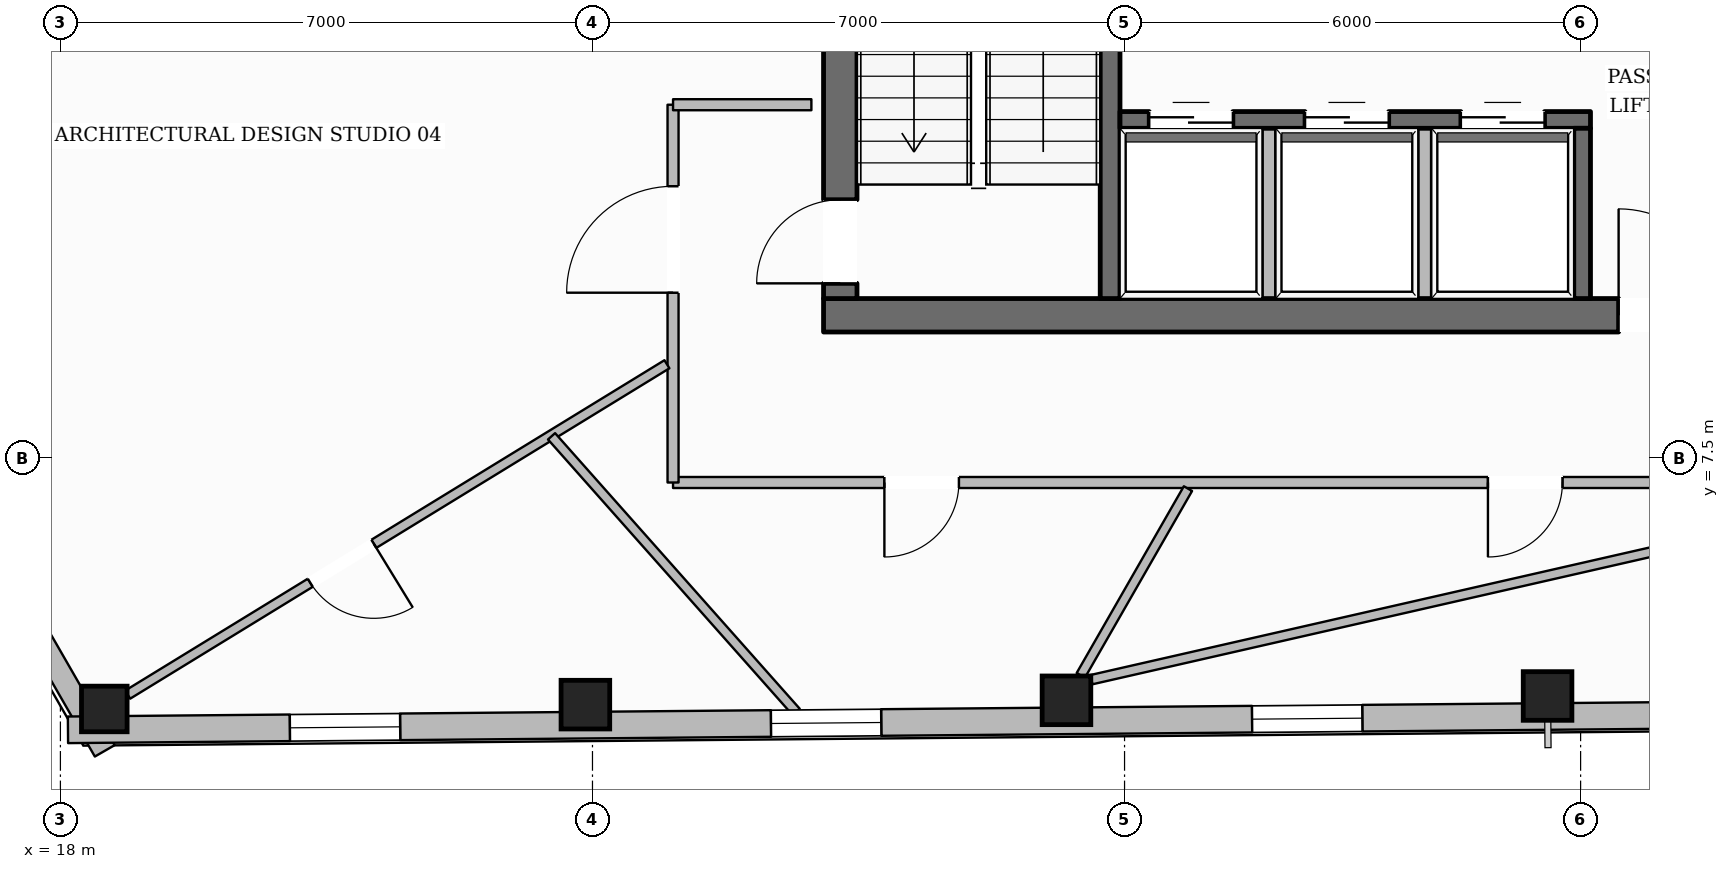
"""IFC4 building model, lengths in metres.
Left out: names, types, materials, properties, quantities, classifications, styles, units other than length and angle.
Written with IfcOpenShell. Run it as: python <this file> out.ifc"""

import sys

from ifc_helpers import new_model, si_unit, direction, frame, frame_2d, origin, origin_2d, place, context, subcontext, project, spatial, rectangle, hollow_rectangle, extrude, element, fill, save


model = new_model("IFC4")
c1 = context("Model", 3, precision=1e-05, world=origin(), true_north=direction((0.0, 1.0)))
c2 = subcontext(c1, "Body", "Model", "MODEL_VIEW")
j1 = project(units=[si_unit("LENGTHUNIT", "METRE"), si_unit("PLANEANGLEUNIT", "RADIAN")], contexts=[c1])
p1 = place(None, origin())
s1 = spatial("IfcSite", under=j1, at=p1, CompositionType="ELEMENT")
p2 = place(p1, origin())
s2 = spatial("IfcBuilding", under=s1, at=p2, CompositionType="ELEMENT")
p3 = place(p2, frame((0.0, 0.0, 215.05)))
s3 = spatial("IfcBuildingStorey", under=s2, at=p3, CompositionType="ELEMENT", Elevation=215.05)
p4 = place(p3, frame((28.04, 9.38, 0.0), z_axis=(0.0, 0.0, 1.0), x_axis=(1.0, 0.0, 0.0)))
e1 = element("IfcWall", 1, at=p4, inside=s3, PredefinedType="SOLIDWALL", context=c2, shape_type="SweptSolid", body=[
    extrude(rectangle(XDim=19.92, YDim=0.44, at=frame_2d((9.96, 0.0))), origin(), (0.0, 0.0, 1.0), 3.6),
])
p5 = place(p4, frame((10.46, 0.0, 0.0)))
e2 = element("IfcOpeningElement", 2, at=p5, cuts=e1, PredefinedType="OPENING", context=c2, shape_type="SweptSolid", body=[
    extrude(rectangle(XDim=1.4, YDim=2.2, at=frame_2d((0.7, 1.1))), frame((0.0, 0.23, 0.0), z_axis=(0.0, -1.0, 0.0), x_axis=(1.0, 0.0, 0.0)), (0.0, 0.0, 1.0), 0.46),
])
p6 = place(p3, frame((28.26, 9.6, 0.0), z_axis=(0.0, 0.0, 1.0), x_axis=(0.0, 1.0, 0.0)))
e3 = element("IfcWall", 3, at=p6, inside=s3, PredefinedType="SOLIDWALL", context=c2, shape_type="SweptSolid", body=[
    extrude(rectangle(XDim=13.0, YDim=0.44, at=frame_2d((6.5, 0.0))), origin(), (0.0, 0.0, 1.0), 3.6),
])
p7 = place(p6, frame((0.2, 0.0, 0.0)))
e4 = element("IfcOpeningElement", 4, at=p7, cuts=e3, PredefinedType="OPENING", context=c2, shape_type="SweptSolid", body=[
    extrude(rectangle(XDim=1.1, YDim=2.15, at=frame_2d((0.55, 1.075))), frame((0.0, 0.23, 0.0), z_axis=(0.0, -1.0, 0.0), x_axis=(1.0, 0.0, 0.0)), (0.0, 0.0, 1.0), 0.46),
])
p8 = place(p6, frame((8.4, 0.0, 0.0)))
e5 = element("IfcOpeningElement", 5, at=p8, cuts=e3, PredefinedType="OPENING", context=c2, shape_type="SweptSolid", body=[
    extrude(rectangle(XDim=0.9, YDim=2.1, at=frame_2d((0.45, 1.05))), frame((0.0, 0.23, 0.0), z_axis=(0.0, -1.0, 0.0), x_axis=(1.0, 0.0, 0.0)), (0.0, 0.0, 1.0), 0.46),
])
p9 = place(p3, frame((31.81, 9.6, 0.0), z_axis=(0.0, 0.0, 1.0), x_axis=(0.0, 1.0, 0.0)))
e6 = element("IfcWall", 6, at=p9, inside=s3, PredefinedType="SHEAR", context=c2, shape_type="SweptSolid", body=[
    extrude(rectangle(XDim=13.0, YDim=0.26, at=frame_2d((6.5, 0.0))), origin(), (0.0, 0.0, 1.0), 3.6),
])
p10 = place(p9, frame((10.925, 0.0, 0.0)))
e7 = element("IfcOpeningElement", 7, at=p10, cuts=e6, PredefinedType="OPENING", context=c2, shape_type="SweptSolid", body=[
    extrude(rectangle(XDim=1.25, YDim=2.25, at=frame_2d((0.625, 1.125))), frame((0.0, 0.14, 0.0), z_axis=(0.0, -1.0, 0.0), x_axis=(1.0, 0.0, 0.0)), (0.0, 0.0, 1.0), 0.28),
])
p11 = place(p3, frame((31.94, 11.95, 0.0), z_axis=(0.0, 0.0, 1.0), x_axis=(1.0, 0.0, 0.0)))
e8 = element("IfcWall", 8, at=p11, inside=s3, PredefinedType="SOLIDWALL", context=c2, shape_type="SweptSolid", body=[
    extrude(rectangle(XDim=6.19, YDim=0.22, at=frame_2d((3.095, 0.0))), origin(), (0.0, 0.0, 1.0), 3.6),
])
p12 = place(p11, frame((0.385, 0.0, 0.0)))
e9 = element("IfcOpeningElement", 9, at=p12, cuts=e8, PredefinedType="OPENING", context=c2, shape_type="SweptSolid", body=[
    extrude(rectangle(XDim=1.1, YDim=2.2, at=frame_2d((0.55, 1.1))), frame((0.0, 0.12, 0.0), z_axis=(0.0, -1.0, 0.0), x_axis=(1.0, 0.0, 0.0)), (0.0, 0.0, 1.0), 0.24),
])
p13 = place(p11, frame((2.435, 0.0, 0.0)))
e10 = element("IfcOpeningElement", 10, at=p13, cuts=e8, PredefinedType="OPENING", context=c2, shape_type="SweptSolid", body=[
    extrude(rectangle(XDim=1.1, YDim=2.2, at=frame_2d((0.55, 1.1))), frame((0.0, 0.12, 0.0), z_axis=(0.0, -1.0, 0.0), x_axis=(1.0, 0.0, 0.0)), (0.0, 0.0, 1.0), 0.24),
])
p14 = place(p11, frame((4.485, 0.0, 0.0)))
e11 = element("IfcOpeningElement", 11, at=p14, cuts=e8, PredefinedType="OPENING", context=c2, shape_type="SweptSolid", body=[
    extrude(rectangle(XDim=1.1, YDim=2.2, at=frame_2d((0.55, 1.1))), frame((0.0, 0.12, 0.0), z_axis=(0.0, -1.0, 0.0), x_axis=(1.0, 0.0, 0.0)), (0.0, 0.0, 1.0), 0.24),
])
p15 = place(p3, frame((38.02, 9.6, 0.0), z_axis=(0.0, 0.0, 1.0), x_axis=(0.0, 1.0, 0.0)))
e12 = element("IfcWall", 12, at=p15, inside=s3, PredefinedType="SOLIDWALL", context=c2, shape_type="SweptSolid", body=[
    extrude(rectangle(XDim=2.24, YDim=0.22, at=frame_2d((1.12, 0.0))), origin(), (0.0, 0.0, 1.0), 3.6),
])
p16 = place(p3, frame((18.577, 4.201, 0.0), z_axis=(0.0, 0.0, 1.0), x_axis=(1.0, 0.0, 0.0)))
e13 = element("IfcColumn", 13, at=p16, inside=s3, PredefinedType="COLUMN", context=c2, shape_type="SweptSolid", body=[
    extrude(hollow_rectangle(XDim=0.6, YDim=0.6, WallThickness=0.028, at=origin_2d()), origin(), (0.0, 0.0, 1.0), 3.6),
])
for number, where, z_axis, x_axis in (
    (14, (24.907, 4.258, 0.0), (0.0, 0.0, 1.0), (1.0, 0.0, 0.0)),
    (15, (31.236, 4.314, 0.0), (0.0, 0.0, 1.0), (1.0, 0.0, 0.0)),
    (16, (37.565, 4.372, 0.0), (0.0, 0.0, 1.0), (1.0, 0.0, 0.0)),
):
    element("IfcColumn", number, at=place(p3, frame(where, z_axis=z_axis, x_axis=x_axis)), inside=s3, PredefinedType="COLUMN", context=c2, shape_type="SweptSolid", body=[
        extrude(hollow_rectangle(XDim=0.64, YDim=0.64, WallThickness=0.028, at=origin_2d()), origin(), (0.0, 0.0, 1.0), 3.6),
    ])
p17 = place(p3, frame((14.13, 10.825, 0.0), z_axis=(0.0, 0.0, 1.0), x_axis=(0.506658543763, 0.862146808863, 0.0)))
e17 = element("IfcWall", 17, at=p17, inside=s3, PredefinedType="STANDARD", context=c2, shape_type="SweptSolid", body=[
    extrude(rectangle(XDim=39.014, YDim=0.35, at=frame_2d((19.507, 0.0))), origin(), (0.0, 0.0, 1.0), 3.132),
])
p18 = place(p17, frame((9.354, 0.0, 0.0)))
e18 = element("IfcOpeningElement", 18, at=p18, cuts=e17, PredefinedType="OPENING", context=c2, shape_type="SweptSolid", body=[
    extrude(rectangle(XDim=1.0, YDim=2.2, at=frame_2d((0.5, 1.1))), frame((0.0, 0.185, 0.0), z_axis=(0.0, -1.0, 0.0), x_axis=(1.0, 0.0, 0.0)), (0.0, 0.0, 1.0), 0.37),
])
p19 = place(p17, frame((34.645, 0.0, 0.65)))
e19 = element("IfcOpeningElement", 19, at=p19, cuts=e17, PredefinedType="OPENING", context=c2, shape_type="SweptSolid", body=[
    extrude(rectangle(XDim=1.45, YDim=1.75, at=frame_2d((0.725, 0.875))), frame((0.0, 0.185, 0.0), z_axis=(0.0, -1.0, 0.0), x_axis=(1.0, 0.0, 0.0)), (0.0, 0.0, 1.0), 0.37),
])
p20 = place(p17, frame((28.301, 0.0, 0.65)))
e20 = element("IfcOpeningElement", 20, at=p20, cuts=e17, PredefinedType="OPENING", context=c2, shape_type="SweptSolid", body=[
    extrude(rectangle(XDim=1.45, YDim=1.75, at=frame_2d((0.725, 0.875))), frame((0.0, 0.185, 0.0), z_axis=(0.0, -1.0, 0.0), x_axis=(1.0, 0.0, 0.0)), (0.0, 0.0, 1.0), 0.37),
])
p21 = place(p17, frame((21.958, 0.0, 0.65)))
e21 = element("IfcOpeningElement", 21, at=p21, cuts=e17, PredefinedType="OPENING", context=c2, shape_type="SweptSolid", body=[
    extrude(rectangle(XDim=1.45, YDim=1.75, at=frame_2d((0.725, 0.875))), frame((0.0, 0.185, 0.0), z_axis=(0.0, -1.0, 0.0), x_axis=(1.0, 0.0, 0.0)), (0.0, 0.0, 1.0), 0.37),
])
p22 = place(p17, frame((2.926, 0.0, 0.65)))
e22 = element("IfcOpeningElement", 22, at=p22, cuts=e17, PredefinedType="OPENING", context=c2, shape_type="SweptSolid", body=[
    extrude(rectangle(XDim=1.45, YDim=1.75, at=frame_2d((0.725, 0.875))), frame((0.0, 0.185, 0.0), z_axis=(0.0, -1.0, 0.0), x_axis=(1.0, 0.0, 0.0)), (0.0, 0.0, 1.0), 0.37),
])
p23 = place(p3, frame((18.583, 3.65, 0.0), z_axis=(0.0, 0.0, 1.0), x_axis=(-0.498897804032, 0.866660822428, 0.0)))
e23 = element("IfcWall", 23, at=p23, inside=s3, PredefinedType="STANDARD", context=c2, shape_type="SweptSolid", body=[
    extrude(rectangle(XDim=8.922, YDim=0.3, at=frame_2d((4.461, 0.0))), origin(), (0.0, 0.0, 1.0), 3.132),
])
p24 = place(p23, frame((3.936, 0.0, 0.65)))
e24 = element("IfcOpeningElement", 24, at=p24, cuts=e23, PredefinedType="OPENING", context=c2, shape_type="SweptSolid", body=[
    extrude(rectangle(XDim=1.05, YDim=1.7, at=frame_2d((0.525, 0.85))), frame((0.0, 0.16, 0.0), z_axis=(0.0, -1.0, 0.0), x_axis=(1.0, 0.0, 0.0)), (0.0, 0.0, 1.0), 0.32),
])
p25 = place(p3, frame((57.027, 4.277, 0.0), z_axis=(0.0, 0.0, 1.0), x_axis=(-0.999959560683, -0.008993163978, 0.0)))
e25 = element("IfcWall", 25, at=p25, inside=s3, PredefinedType="STANDARD", context=c2, shape_type="SweptSolid", body=[
    extrude(rectangle(XDim=38.929, YDim=0.35, at=frame_2d((19.465, 0.0))), origin(), (0.0, 0.0, 1.0), 3.132),
])
p26 = place(p25, frame((9.332, 0.0, 0.0)))
e26 = element("IfcOpeningElement", 26, at=p26, cuts=e25, PredefinedType="OPENING", context=c2, shape_type="SweptSolid", body=[
    extrude(rectangle(XDim=1.0, YDim=2.2, at=frame_2d((0.5, 1.1))), frame((0.0, 0.185, 0.0), z_axis=(0.0, -1.0, 0.0), x_axis=(1.0, 0.0, 0.0)), (0.0, 0.0, 1.0), 0.37),
])
p27 = place(p25, frame((34.559, 0.0, 0.65)))
e27 = element("IfcOpeningElement", 27, at=p27, cuts=e25, PredefinedType="OPENING", context=c2, shape_type="SweptSolid", body=[
    extrude(rectangle(XDim=1.45, YDim=1.75, at=frame_2d((0.725, 0.875))), frame((0.0, 0.185, 0.0), z_axis=(0.0, -1.0, 0.0), x_axis=(1.0, 0.0, 0.0)), (0.0, 0.0, 1.0), 0.37),
])
p28 = place(p25, frame((28.229, 0.0, 0.65)))
e28 = element("IfcOpeningElement", 28, at=p28, cuts=e25, PredefinedType="OPENING", context=c2, shape_type="SweptSolid", body=[
    extrude(rectangle(XDim=1.45, YDim=1.75, at=frame_2d((0.725, 0.875))), frame((0.0, 0.185, 0.0), z_axis=(0.0, -1.0, 0.0), x_axis=(1.0, 0.0, 0.0)), (0.0, 0.0, 1.0), 0.37),
])
p29 = place(p25, frame((21.9, 0.0, 0.65)))
e29 = element("IfcOpeningElement", 29, at=p29, cuts=e25, PredefinedType="OPENING", context=c2, shape_type="SweptSolid", body=[
    extrude(rectangle(XDim=1.45, YDim=1.75, at=frame_2d((0.725, 0.875))), frame((0.0, 0.185, 0.0), z_axis=(0.0, -1.0, 0.0), x_axis=(1.0, 0.0, 0.0)), (0.0, 0.0, 1.0), 0.37),
])
p30 = place(p25, frame((2.912, 0.0, 0.65)))
e30 = element("IfcOpeningElement", 30, at=p30, cuts=e25, PredefinedType="OPENING", context=c2, shape_type="SweptSolid", body=[
    extrude(rectangle(XDim=1.45, YDim=1.75, at=frame_2d((0.725, 0.875))), frame((0.0, 0.185, 0.0), z_axis=(0.0, -1.0, 0.0), x_axis=(1.0, 0.0, 0.0)), (0.0, 0.0, 1.0), 0.37),
])
for number, where, z_axis, x_axis in (
    (31, (33.9, 9.52, 0.0), (0.0, 0.0, 1.0), (0.0, 1.0, 0.0)),
    (32, (35.95, 9.52, 0.0), (0.0, 0.0, 1.0), (0.0, 1.0, 0.0)),
):
    element("IfcWall", number, at=place(p3, frame(where, z_axis=z_axis, x_axis=x_axis)), inside=s3, PredefinedType="PARTITIONING", context=c2, shape_type="SweptSolid", body=[
        extrude(rectangle(XDim=2.32, YDim=0.165, at=frame_2d((1.16, 0.0))), origin(), (0.0, 0.0, 1.0), 3.6),
    ])
p31 = place(p3, frame((49.94, 7.18, 0.0), z_axis=(0.0, 0.0, 1.0), x_axis=(-1.0, 0.0, 0.0)))
e33 = element("IfcWall", 33, at=p31, inside=s3, PredefinedType="PARTITIONING", context=c2, shape_type="SweptSolid", body=[
    extrude(rectangle(XDim=23.88, YDim=0.145, at=frame_2d((11.94, 0.0))), origin(), (0.0, 0.0, 1.0), 3.6),
])
p32 = place(p31, frame((20.119, 0.0, 0.0)))
e34 = element("IfcOpeningElement", 34, at=p32, cuts=e33, PredefinedType="OPENING", context=c2, shape_type="SweptSolid", body=[
    extrude(rectangle(XDim=0.98, YDim=2.15, at=frame_2d((0.49, 1.075))), frame((0.0, 0.083, 0.0), z_axis=(0.0, -1.0, 0.0), x_axis=(1.0, 0.0, 0.0)), (0.0, 0.0, 1.0), 0.165),
])
p33 = place(p31, frame((12.179, 0.0, 0.0)))
e35 = element("IfcOpeningElement", 35, at=p33, cuts=e33, PredefinedType="OPENING", context=c2, shape_type="SweptSolid", body=[
    extrude(rectangle(XDim=0.98, YDim=2.15, at=frame_2d((0.49, 1.075))), frame((0.0, 0.083, 0.0), z_axis=(0.0, -1.0, 0.0), x_axis=(1.0, 0.0, 0.0)), (0.0, 0.0, 1.0), 0.165),
])
p34 = place(p31, frame((4.392, 0.0, 0.0)))
e36 = element("IfcOpeningElement", 36, at=p34, cuts=e33, PredefinedType="OPENING", context=c2, shape_type="SweptSolid", body=[
    extrude(rectangle(XDim=0.98, YDim=2.15, at=frame_2d((0.49, 1.075))), frame((0.0, 0.083, 0.0), z_axis=(0.0, -1.0, 0.0), x_axis=(1.0, 0.0, 0.0)), (0.0, 0.0, 1.0), 0.165),
])
p35 = place(p3, frame((26.06, 7.18, 0.0), z_axis=(0.0, 0.0, 1.0), x_axis=(0.0, 1.0, 0.0)))
e37 = element("IfcWall", 37, at=p35, inside=s3, PredefinedType="PARTITIONING", context=c2, shape_type="SweptSolid", body=[
    extrude(rectangle(XDim=4.97, YDim=0.145, at=frame_2d((2.485, 0.0))), origin(), (0.0, 0.0, 1.0), 3.6),
])
p36 = place(p35, frame((2.497, 0.0, 0.0)))
e38 = element("IfcOpeningElement", 38, at=p36, cuts=e37, PredefinedType="OPENING", context=c2, shape_type="SweptSolid", body=[
    extrude(rectangle(XDim=1.4, YDim=2.2, at=frame_2d((0.7, 1.1))), frame((0.0, 0.083, 0.0), z_axis=(0.0, -1.0, 0.0), x_axis=(1.0, 0.0, 0.0)), (0.0, 0.0, 1.0), 0.165),
])
p37 = place(p3, frame((26.06, 12.15, 0.0), z_axis=(0.0, 0.0, 1.0), x_axis=(1.0, 0.0, 0.0)))
e39 = element("IfcWall", 39, at=p37, inside=s3, PredefinedType="PARTITIONING", context=c2, shape_type="SweptSolid", body=[
    extrude(rectangle(XDim=1.82, YDim=0.145, at=frame_2d((0.91, 0.0))), origin(), (0.0, 0.0, 1.0), 3.6),
])
p38 = place(p3, frame((25.979, 8.736, 0.0), z_axis=(0.0, 0.0, 1.0), x_axis=(-0.852694447683, -0.522409972043, 0.0)))
e40 = element("IfcWall", 40, at=p38, inside=s3, PredefinedType="PARTITIONING", context=c2, shape_type="SweptSolid", body=[
    extrude(rectangle(XDim=8.32, YDim=0.125, at=frame_2d((4.16, 0.0))), origin(), (0.0, 0.0, 1.0), 3.141),
])
p39 = place(p38, frame((4.522, 0.0, 0.0)))
e41 = element("IfcOpeningElement", 41, at=p39, cuts=e40, PredefinedType="OPENING", context=c2, shape_type="SweptSolid", body=[
    extrude(rectangle(XDim=0.98, YDim=2.15, at=frame_2d((0.49, 1.075))), frame((0.0, 0.073, 0.0), z_axis=(0.0, -1.0, 0.0), x_axis=(1.0, 0.0, 0.0)), (0.0, 0.0, 1.0), 0.145),
])
p40 = place(p3, frame((32.834, 7.1, 0.0), z_axis=(0.0, 0.0, 1.0), x_axis=(-0.497706658822, -0.867345422404, 0.0)))
e42 = element("IfcWall", 42, at=p40, inside=s3, PredefinedType="PARTITIONING", context=c2, shape_type="SweptSolid", body=[
    extrude(rectangle(XDim=2.833, YDim=0.125, at=frame_2d((1.417, 0.0))), origin(), (0.0, 0.0, 1.0), 3.6),
])
p41 = place(p3, frame((24.461, 7.788, 0.0), z_axis=(0.0, 0.0, 1.0), x_axis=(0.663882302214, -0.747837073705, 0.0)))
e43 = element("IfcWall", 43, at=p41, inside=s3, PredefinedType="PARTITIONING", context=c2, shape_type="SweptSolid", body=[
    extrude(rectangle(XDim=4.848, YDim=0.125, at=frame_2d((2.424, 0.0))), origin(), (0.0, 0.0, 1.0), 3.6),
])
p42 = place(p3, frame((31.564, 4.586, 0.0), z_axis=(0.0, 0.0, 1.0), x_axis=(0.97496923537, 0.222339807685, 0.0)))
e44 = element("IfcWall", 44, at=p42, inside=s3, PredefinedType="PARTITIONING", context=c2, shape_type="SweptSolid", body=[
    extrude(rectangle(XDim=11.304, YDim=0.125, at=frame_2d((5.652, 0.0))), origin(), (0.0, 0.0, 1.0), 3.339),
])
p43 = place(p27, origin())
e45 = element("IfcWindow", 45, at=p43, inside=s3, PartitioningType="SINGLE_PANEL", PredefinedType="WINDOW", context=c2, shape_type="SweptSolid", body=[
    extrude(rectangle(XDim=1.45, YDim=1.75, at=frame_2d((0.725, 0.875))), frame((0.0, 0.03, 0.0), z_axis=(0.0, -1.0, 0.0), x_axis=(1.0, 0.0, 0.0)), (0.0, 0.0, 1.0), 0.06),
])
fill(e27, e45)
p44 = place(p28, origin())
e46 = element("IfcWindow", 46, at=p44, inside=s3, PartitioningType="SINGLE_PANEL", PredefinedType="WINDOW", context=c2, shape_type="SweptSolid", body=[
    extrude(rectangle(XDim=1.45, YDim=1.75, at=frame_2d((0.725, 0.875))), frame((0.0, 0.03, 0.0), z_axis=(0.0, -1.0, 0.0), x_axis=(1.0, 0.0, 0.0)), (0.0, 0.0, 1.0), 0.06),
])
fill(e28, e46)
p45 = place(p29, origin())
e47 = element("IfcWindow", 47, at=p45, inside=s3, PartitioningType="SINGLE_PANEL", PredefinedType="WINDOW", context=c2, shape_type="SweptSolid", body=[
    extrude(rectangle(XDim=1.45, YDim=1.75, at=frame_2d((0.725, 0.875))), frame((0.0, 0.03, 0.0), z_axis=(0.0, -1.0, 0.0), x_axis=(1.0, 0.0, 0.0)), (0.0, 0.0, 1.0), 0.06),
])
fill(e29, e47)
p46 = place(p7, origin())
e48 = element("IfcDoor", 48, at=p46, inside=s3, OperationType="SINGLE_SWING_LEFT", PredefinedType="DOOR", context=c2, shape_type="SweptSolid", body=[
    extrude(rectangle(XDim=1.1, YDim=2.15, at=frame_2d((0.55, 1.075))), frame((0.0, 0.025, 0.0), z_axis=(0.0, -1.0, 0.0), x_axis=(1.0, 0.0, 0.0)), (0.0, 0.0, 1.0), 0.05),
])
fill(e4, e48)
p47 = place(p5, origin())
e49 = element("IfcDoor", 49, at=p47, inside=s3, OperationType="SINGLE_SWING_LEFT", PredefinedType="DOOR", context=c2, shape_type="SweptSolid", body=[
    extrude(rectangle(XDim=1.4, YDim=2.2, at=frame_2d((0.7, 1.1))), frame((0.0, 0.025, 0.0), z_axis=(0.0, -1.0, 0.0), x_axis=(1.0, 0.0, 0.0)), (0.0, 0.0, 1.0), 0.05),
])
fill(e2, e49)
p48 = place(p12, origin())
e50 = element("IfcDoor", 50, at=p48, inside=s3, OperationType="DOUBLE_DOOR_SLIDING", PredefinedType="DOOR", context=c2, shape_type="SweptSolid", body=[
    extrude(rectangle(XDim=1.1, YDim=2.2, at=frame_2d((0.55, 1.1))), frame((0.0, 0.025, 0.0), z_axis=(0.0, -1.0, 0.0), x_axis=(1.0, 0.0, 0.0)), (0.0, 0.0, 1.0), 0.05),
])
fill(e9, e50)
p49 = place(p13, origin())
e51 = element("IfcDoor", 51, at=p49, inside=s3, OperationType="DOUBLE_DOOR_SLIDING", PredefinedType="DOOR", context=c2, shape_type="SweptSolid", body=[
    extrude(rectangle(XDim=1.1, YDim=2.2, at=frame_2d((0.55, 1.1))), frame((0.0, 0.025, 0.0), z_axis=(0.0, -1.0, 0.0), x_axis=(1.0, 0.0, 0.0)), (0.0, 0.0, 1.0), 0.05),
])
fill(e10, e51)
p50 = place(p14, origin())
e52 = element("IfcDoor", 52, at=p50, inside=s3, OperationType="DOUBLE_DOOR_SLIDING", PredefinedType="DOOR", context=c2, shape_type="SweptSolid", body=[
    extrude(rectangle(XDim=1.1, YDim=2.2, at=frame_2d((0.55, 1.1))), frame((0.0, 0.025, 0.0), z_axis=(0.0, -1.0, 0.0), x_axis=(1.0, 0.0, 0.0)), (0.0, 0.0, 1.0), 0.05),
])
fill(e11, e52)
p51 = place(p36, origin())
e53 = element("IfcDoor", 53, at=p51, inside=s3, OperationType="SINGLE_SWING_LEFT", PredefinedType="DOOR", context=c2, shape_type="SweptSolid", body=[
    extrude(rectangle(XDim=1.4, YDim=2.2, at=frame_2d((0.7, 1.1))), frame((0.0, 0.025, 0.0), z_axis=(0.0, -1.0, 0.0), x_axis=(1.0, 0.0, 0.0)), (0.0, 0.0, 1.0), 0.05),
])
fill(e38, e53)
p52 = place(p32, origin())
e54 = element("IfcDoor", 54, at=p52, inside=s3, OperationType="SINGLE_SWING_RIGHT", PredefinedType="DOOR", context=c2, shape_type="SweptSolid", body=[
    extrude(rectangle(XDim=0.98, YDim=2.15, at=frame_2d((0.49, 1.075))), frame((0.0, 0.025, 0.0), z_axis=(0.0, -1.0, 0.0), x_axis=(1.0, 0.0, 0.0)), (0.0, 0.0, 1.0), 0.05),
])
fill(e34, e54)
p53 = place(p39, origin())
e55 = element("IfcDoor", 55, at=p53, inside=s3, OperationType="SINGLE_SWING_LEFT", PredefinedType="DOOR", context=c2, shape_type="SweptSolid", body=[
    extrude(rectangle(XDim=0.98, YDim=2.15, at=frame_2d((0.49, 1.075))), frame((0.0, 0.025, 0.0), z_axis=(0.0, -1.0, 0.0), x_axis=(1.0, 0.0, 0.0)), (0.0, 0.0, 1.0), 0.05),
])
fill(e41, e55)
p54 = place(p33, origin())
e56 = element("IfcDoor", 56, at=p54, inside=s3, OperationType="SINGLE_SWING_RIGHT", PredefinedType="DOOR", context=c2, shape_type="SweptSolid", body=[
    extrude(rectangle(XDim=0.98, YDim=2.15, at=frame_2d((0.49, 1.075))), frame((0.0, 0.025, 0.0), z_axis=(0.0, -1.0, 0.0), x_axis=(1.0, 0.0, 0.0)), (0.0, 0.0, 1.0), 0.05),
])
fill(e35, e56)
save(model, sys.argv[1])
